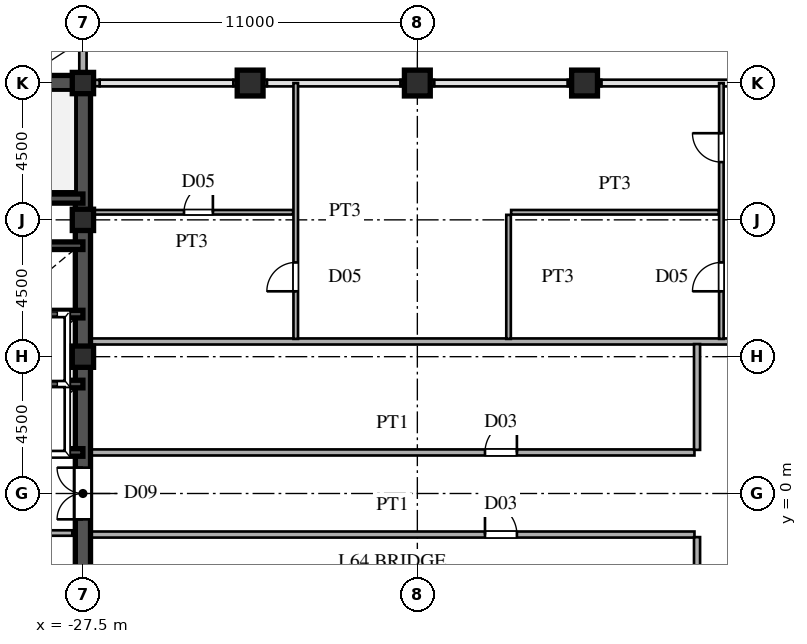
"""IFC4 building model, lengths in metres.
Left out: names, types, materials, properties, quantities, classifications, styles, units other than length and angle.
Written with IfcOpenShell. Run it as: python <this file> out.ifc"""

import sys

from ifc_helpers import new_model, si_unit, direction, frame, frame_2d, origin, origin_2d, place, context, subcontext, project, spatial, rectangle, hollow_rectangle, extrude, source, transform, mapped, element, fill, save


model = new_model("IFC4")
c1 = context("Model", 3, precision=1e-05, world=origin(), true_north=direction((0.0, 1.0)))
c2 = subcontext(c1, "Body", "Model", "MODEL_VIEW")
j1 = project(units=[si_unit("LENGTHUNIT", "METRE"), si_unit("PLANEANGLEUNIT", "RADIAN")], contexts=[c1])
p1 = place(None, origin())
s1 = spatial("IfcSite", under=j1, at=p1, CompositionType="ELEMENT")
p2 = place(p1, origin())
s2 = spatial("IfcBuilding", under=s1, at=p2, CompositionType="ELEMENT")
p3 = place(p2, frame((0.0, 0.0, 243.15)))
s3 = spatial("IfcBuildingStorey", under=s2, at=p3, CompositionType="ELEMENT", Elevation=243.15)
m1 = source(origin(), c2, "Body", "SweptSolid", [
    extrude(hollow_rectangle(XDim=0.7, YDim=0.7, WallThickness=0.03, at=origin_2d()), origin(), (0.0, 0.0, 1.0), 3.75),
])
for number, where, z_axis, x_axis in (
    (1, (-27.5, 4.5, 0.0), (0.0, 0.0, 1.0), (1.0, 0.0, 0.0)),
    (2, (-27.5, 9.0, 0.0), (0.0, 0.0, 1.0), (1.0, 0.0, 0.0)),
    (3, (-27.5, 13.5, 0.0), (0.0, 0.0, 1.0), (1.0, 0.0, 0.0)),
):
    element("IfcColumn", number, at=place(p3, frame(where, z_axis=z_axis, x_axis=x_axis)), inside=s3, PredefinedType="COLUMN", context=c2, shape_type="MappedRepresentation", body=[
        mapped(m1, transform((0.0, 0.0, 0.0), scale=1.0)),
    ])
m2 = source(origin(), c2, "Body", "SweptSolid", [
    extrude(hollow_rectangle(XDim=0.85, YDim=0.85, WallThickness=0.036, at=origin_2d()), origin(), (0.0, 0.0, 1.0), 3.75),
])
for number, where, z_axis, x_axis in (
    (4, (-22.0, 13.5, 0.0), (0.0, 0.0, 1.0), (1.0, 0.0, 0.0)),
    (5, (-16.5, 13.5, 0.0), (0.0, 0.0, 1.0), (1.0, 0.0, 0.0)),
    (6, (-11.0, 13.5, 0.0), (0.0, 0.0, 1.0), (1.0, 0.0, 0.0)),
):
    element("IfcColumn", number, at=place(p3, frame(where, z_axis=z_axis, x_axis=x_axis)), inside=s3, PredefinedType="COLUMN", context=c2, shape_type="MappedRepresentation", body=[
        mapped(m2, transform((0.0, 0.0, 0.0), scale=1.0)),
    ])
p4 = place(p3, frame((-27.5, 13.755, 0.0), z_axis=(0.0, 0.0, 1.0), x_axis=(0.0, 1.0, 0.0)))
e7 = element("IfcWall", 7, at=p4, inside=s3, PredefinedType="SOLIDWALL", context=c2, shape_type="SweptSolid", body=[
    extrude(rectangle(XDim=0.62, YDim=0.24, at=frame_2d((0.31, 0.0))), origin(), (0.0, 0.0, 1.0), 3.03),
])
p5 = place(p3, frame((-27.5, 14.375, 0.0), z_axis=(0.0, 0.0, 1.0), x_axis=(0.0, 1.0, 0.0)))
e8 = element("IfcWall", 8, at=p5, inside=s3, PredefinedType="SOLIDWALL", context=c2, shape_type="SweptSolid", body=[
    extrude(rectangle(XDim=1.605, YDim=0.24, at=frame_2d((0.803, 0.0))), origin(), (0.0, 0.0, 1.0), 3.53),
])
p6 = place(p3, frame((-27.49, 13.5, 0.0), z_axis=(0.0, 0.0, 1.0), x_axis=(1.0, 0.0, 0.0)))
e9 = element("IfcWall", 9, at=p6, inside=s3, PredefinedType="SOLIDWALL", context=c2, shape_type="SweptSolid", body=[
    extrude(rectangle(XDim=0.54, YDim=0.21, at=frame_2d((0.27, 0.0))), origin(), (0.0, 0.0, 1.0), 3.03),
])
for number, where, z_axis, x_axis in (
    (10, (-22.55, 13.5, 0.0), (0.0, 0.0, 1.0), (1.0, 0.0, 0.0)),
    (11, (-17.05, 13.5, 0.0), (0.0, 0.0, 1.0), (1.0, 0.0, 0.0)),
    (12, (-11.55, 13.5, 0.0), (0.0, 0.0, 1.0), (1.0, 0.0, 0.0)),
):
    element("IfcWall", number, at=place(p3, frame(where, z_axis=z_axis, x_axis=x_axis)), inside=s3, PredefinedType="SOLIDWALL", context=c2, shape_type="SweptSolid", body=[
        extrude(rectangle(XDim=1.1, YDim=0.21, at=frame_2d((0.55, 0.0))), origin(), (0.0, 0.0, 1.0), 3.03),
    ])
for number, where, z_axis, x_axis in (
    (13, (-27.5, -13.5, 0.0), (0.0, 0.0, 1.0), (0.0, 1.0, 0.0)),
    (14, (-27.5, 1.3, 0.0), (0.0, 0.0, 1.0), (0.0, 1.0, 0.0)),
):
    element("IfcWall", number, at=place(p3, frame(where, z_axis=z_axis, x_axis=x_axis)), inside=s3, PredefinedType="SHEAR", context=c2, shape_type="SweptSolid", body=[
        extrude(rectangle(XDim=12.2, YDim=0.5, at=frame_2d((6.1, 0.0))), origin(), (0.0, 0.0, 1.0), 3.53),
    ])
p7 = place(p3, frame((-27.5, -1.3, 0.0), z_axis=(0.0, 0.0, 1.0), x_axis=(0.0, 1.0, 0.0)))
e15 = element("IfcWall", 15, at=p7, inside=s3, PredefinedType="SHEAR", context=c2, shape_type="SweptSolid", body=[
    extrude(rectangle(XDim=2.6, YDim=0.5, at=frame_2d((1.3, 0.0))), origin(), (0.0, 0.0, 1.0), 3.53),
])
p8 = place(p7, frame((0.45, 0.0, 0.0)))
e16 = element("IfcOpeningElement", 16, at=p8, cuts=e15, PredefinedType="OPENING", context=c2, shape_type="SweptSolid", body=[
    extrude(rectangle(XDim=1.7, YDim=2.35, at=frame_2d((0.85, 1.175))), frame((0.0, 0.26, 0.0), z_axis=(0.0, -1.0, 0.0), x_axis=(1.0, 0.0, 0.0)), (0.0, 0.0, 1.0), 0.52),
])
p9 = place(p3, frame((-36.5, 13.5, 0.0), z_axis=(0.0, 0.0, 1.0), x_axis=(1.0, 0.0, 0.0)))
e17 = element("IfcWall", 17, at=p9, inside=s3, PredefinedType="SHEAR", context=c2, shape_type="SweptSolid", body=[
    extrude(rectangle(XDim=9.0, YDim=0.5, at=frame_2d((4.5, 0.0))), origin(), (0.0, 0.0, 1.0), 3.53),
])
p10 = place(p3, frame((-36.5, 9.7, 0.0), z_axis=(0.0, 0.0, 1.0), x_axis=(1.0, 0.0, 0.0)))
e18 = element("IfcWall", 18, at=p10, inside=s3, PredefinedType="SHEAR", context=c2, shape_type="SweptSolid", body=[
    extrude(rectangle(XDim=9.0, YDim=0.3, at=frame_2d((4.5, 0.0))), origin(), (0.0, 0.0, 1.0), 3.53),
])
p11 = place(p10, frame((0.6, 0.0, 0.0)))
e19 = element("IfcOpeningElement", 19, at=p11, cuts=e18, PredefinedType="OPENING", context=c2, shape_type="SweptSolid", body=[
    extrude(rectangle(XDim=1.1, YDim=2.2, at=frame_2d((0.55, 1.1))), frame((0.0, 0.16, 0.0), z_axis=(0.0, -1.0, 0.0), x_axis=(1.0, 0.0, 0.0)), (0.0, 0.0, 1.0), 0.32),
])
for number, where, z_axis, x_axis in (
    (20, (-30.3, 1.35, 0.0), (0.0, 0.0, 1.0), (1.0, 0.0, 0.0)),
    (21, (-30.3, 3.6, 0.0), (0.0, 0.0, 1.0), (1.0, 0.0, 0.0)),
    (22, (-30.3, 5.9, 0.0), (0.0, 0.0, 1.0), (1.0, 0.0, 0.0)),
    (23, (-30.3, 8.15, 0.0), (0.0, 0.0, 1.0), (1.0, 0.0, 0.0)),
):
    element("IfcWall", number, at=place(p3, frame(where, z_axis=z_axis, x_axis=x_axis)), inside=s3, PredefinedType="SHEAR", context=c2, shape_type="SweptSolid", body=[
        extrude(rectangle(XDim=2.8, YDim=0.25, at=frame_2d((1.4, 0.0))), origin(), (0.0, 0.0, 1.0), 3.53),
    ])
p12 = place(p3, frame((-30.3, -1.3, 0.0), z_axis=(0.0, 0.0, 1.0), x_axis=(1.0, 0.0, 0.0)))
e24 = element("IfcWall", 24, at=p12, inside=s3, PredefinedType="PARTITIONING", context=c2, shape_type="SweptSolid", body=[
    extrude(rectangle(XDim=2.45, YDim=0.18, at=frame_2d((1.225, 0.0))), origin(), (0.0, 0.0, 1.0), 3.53),
])
p13 = place(p12, frame((0.275, 0.0, 0.0)))
e25 = element("IfcOpeningElement", 25, at=p13, cuts=e24, PredefinedType="OPENING", context=c2, shape_type="SweptSolid", body=[
    extrude(rectangle(XDim=0.95, YDim=2.15, at=frame_2d((0.475, 1.075))), frame((0.0, 0.1, 0.0), z_axis=(0.0, -1.0, 0.0), x_axis=(1.0, 0.0, 0.0)), (0.0, 0.0, 1.0), 0.2),
])
p14 = place(p3, frame((-27.245, -1.35, 0.0), z_axis=(0.0, 0.0, 1.0), x_axis=(1.0, 0.0, 0.0)))
e26 = element("IfcWall", 26, at=p14, inside=s3, PredefinedType="PARTITIONING", context=c2, shape_type="SweptSolid", body=[
    extrude(rectangle(XDim=19.86, YDim=0.2, at=frame_2d((9.93, 0.0))), origin(), (0.0, 0.0, 1.0), 3.53),
])
p15 = place(p14, frame((12.97, 0.0, 0.0)))
e27 = element("IfcOpeningElement", 27, at=p15, cuts=e26, PredefinedType="OPENING", context=c2, shape_type="SweptSolid", body=[
    extrude(rectangle(XDim=1.05, YDim=2.25, at=frame_2d((0.525, 1.125))), frame((0.0, 0.11, 0.0), z_axis=(0.0, -1.0, 0.0), x_axis=(1.0, 0.0, 0.0)), (0.0, 0.0, 1.0), 0.22),
])
p16 = place(p3, frame((-27.245, 1.35, 0.0), z_axis=(0.0, 0.0, 1.0), x_axis=(1.0, 0.0, 0.0)))
e28 = element("IfcWall", 28, at=p16, inside=s3, PredefinedType="PARTITIONING", context=c2, shape_type="SweptSolid", body=[
    extrude(rectangle(XDim=19.86, YDim=0.2, at=frame_2d((9.93, 0.0))), origin(), (0.0, 0.0, 1.0), 3.53),
])
p17 = place(p16, frame((12.97, 0.0, 0.0)))
e29 = element("IfcOpeningElement", 29, at=p17, cuts=e28, PredefinedType="OPENING", context=c2, shape_type="SweptSolid", body=[
    extrude(rectangle(XDim=1.05, YDim=2.25, at=frame_2d((0.525, 1.125))), frame((0.0, 0.11, 0.0), z_axis=(0.0, -1.0, 0.0), x_axis=(1.0, 0.0, 0.0)), (0.0, 0.0, 1.0), 0.22),
])
p18 = place(p3, frame((-27.245, 5.0, 0.0), z_axis=(0.0, 0.0, 1.0), x_axis=(1.0, 0.0, 0.0)))
e30 = element("IfcWall", 30, at=p18, inside=s3, PredefinedType="PARTITIONING", context=c2, shape_type="SweptSolid", body=[
    extrude(rectangle(XDim=54.49, YDim=0.2, at=frame_2d((27.245, 0.0))), origin(), (0.0, 0.0, 1.0), 3.53),
])
p19 = place(p18, frame((23.47, 0.0, 0.0)))
e31 = element("IfcOpeningElement", 31, at=p19, cuts=e30, PredefinedType="OPENING", context=c2, shape_type="SweptSolid", body=[
    extrude(rectangle(XDim=1.05, YDim=2.25, at=frame_2d((0.525, 1.125))), frame((0.0, 0.11, 0.0), z_axis=(0.0, -1.0, 0.0), x_axis=(1.0, 0.0, 0.0)), (0.0, 0.0, 1.0), 0.22),
])
p20 = place(p3, frame((-27.245, 9.25, 0.0), z_axis=(0.0, 0.0, 1.0), x_axis=(1.0, 0.0, 0.0)))
e32 = element("IfcWall", 32, at=p20, inside=s3, PredefinedType="PARTITIONING", context=c2, shape_type="SweptSolid", body=[
    extrude(rectangle(XDim=6.66, YDim=0.15, at=frame_2d((3.33, 0.0))), origin(), (0.0, 0.0, 1.0), 3.53),
])
p21 = place(p20, frame((3.07, 0.0, 0.0)))
e33 = element("IfcOpeningElement", 33, at=p21, cuts=e32, PredefinedType="OPENING", context=c2, shape_type="SweptSolid", body=[
    extrude(rectangle(XDim=0.95, YDim=2.15, at=frame_2d((0.475, 1.075))), frame((0.0, 0.085, 0.0), z_axis=(0.0, -1.0, 0.0), x_axis=(1.0, 0.0, 0.0)), (0.0, 0.0, 1.0), 0.17),
])
p22 = place(p3, frame((-13.415, 9.25, 0.0), z_axis=(0.0, 0.0, 1.0), x_axis=(1.0, 0.0, 0.0)))
e34 = element("IfcWall", 34, at=p22, inside=s3, PredefinedType="PARTITIONING", context=c2, shape_type="SweptSolid", body=[
    extrude(rectangle(XDim=6.83, YDim=0.15, at=frame_2d((3.415, 0.0))), origin(), (0.0, 0.0, 1.0), 3.53),
])
p23 = place(p3, frame((-20.5, 5.085, 0.0), z_axis=(0.0, 0.0, 1.0), x_axis=(0.0, 1.0, 0.0)))
e35 = element("IfcWall", 35, at=p23, inside=s3, PredefinedType="PARTITIONING", context=c2, shape_type="SweptSolid", body=[
    extrude(rectangle(XDim=8.415, YDim=0.15, at=frame_2d((4.208, 0.0))), origin(), (0.0, 0.0, 1.0), 3.53),
])
p24 = place(p23, frame((1.565, 0.0, 0.0)))
e36 = element("IfcOpeningElement", 36, at=p24, cuts=e35, PredefinedType="OPENING", context=c2, shape_type="SweptSolid", body=[
    extrude(rectangle(XDim=0.95, YDim=2.15, at=frame_2d((0.475, 1.075))), frame((0.0, 0.085, 0.0), z_axis=(0.0, -1.0, 0.0), x_axis=(1.0, 0.0, 0.0)), (0.0, 0.0, 1.0), 0.17),
])
p25 = place(p3, frame((-13.5, 5.085, 0.0), z_axis=(0.0, 0.0, 1.0), x_axis=(0.0, 1.0, 0.0)))
e37 = element("IfcWall", 37, at=p25, inside=s3, PredefinedType="PARTITIONING", context=c2, shape_type="SweptSolid", body=[
    extrude(rectangle(XDim=4.08, YDim=0.15, at=frame_2d((2.04, 0.0))), origin(), (0.0, 0.0, 1.0), 3.53),
])
for number, where, z_axis, x_axis in (
    (38, (-7.3, -4.915, 0.0), (0.0, 0.0, 1.0), (0.0, 1.0, 0.0)),
    (39, (-7.3, 1.435, 0.0), (0.0, 0.0, 1.0), (0.0, 1.0, 0.0)),
):
    element("IfcWall", number, at=place(p3, frame(where, z_axis=z_axis, x_axis=x_axis)), inside=s3, PredefinedType="PARTITIONING", context=c2, shape_type="SweptSolid", body=[
        extrude(rectangle(XDim=3.48, YDim=0.2, at=frame_2d((1.74, 0.0))), origin(), (0.0, 0.0, 1.0), 3.53),
    ])
p26 = place(p3, frame((-6.5, 5.085, 0.0), z_axis=(0.0, 0.0, 1.0), x_axis=(0.0, 1.0, 0.0)))
e40 = element("IfcWall", 40, at=p26, inside=s3, PredefinedType="PARTITIONING", context=c2, shape_type="SweptSolid", body=[
    extrude(rectangle(XDim=8.415, YDim=0.15, at=frame_2d((4.208, 0.0))), origin(), (0.0, 0.0, 1.0), 3.53),
])
p27 = place(p26, frame((1.565, 0.0, 0.0)))
e41 = element("IfcOpeningElement", 41, at=p27, cuts=e40, PredefinedType="OPENING", context=c2, shape_type="SweptSolid", body=[
    extrude(rectangle(XDim=0.95, YDim=2.15, at=frame_2d((0.475, 1.075))), frame((0.0, 0.085, 0.0), z_axis=(0.0, -1.0, 0.0), x_axis=(1.0, 0.0, 0.0)), (0.0, 0.0, 1.0), 0.17),
])
p28 = place(p26, frame((5.815, 0.0, 0.0)))
e42 = element("IfcOpeningElement", 42, at=p28, cuts=e40, PredefinedType="OPENING", context=c2, shape_type="SweptSolid", body=[
    extrude(rectangle(XDim=0.95, YDim=2.15, at=frame_2d((0.475, 1.075))), frame((0.0, 0.085, 0.0), z_axis=(0.0, -1.0, 0.0), x_axis=(1.0, 0.0, 0.0)), (0.0, 0.0, 1.0), 0.17),
])
m3 = source(origin(), c2, "Body", "SweptSolid", [
    extrude(rectangle(XDim=1.7, YDim=2.35, at=frame_2d((0.85, 1.175))), frame((0.0, 0.025, 0.0), z_axis=(0.0, -1.0, 0.0), x_axis=(1.0, 0.0, 0.0)), (0.0, 0.0, 1.0), 0.05),
])
p29 = place(p8, origin())
e43 = element("IfcDoor", 43, at=p29, inside=s3, OperationType="DOUBLE_SWING_LEFT", PredefinedType="DOOR", context=c2, shape_type="MappedRepresentation", body=[
    mapped(m3, transform((0.0, 0.0, 0.0), scale=1.0)),
])
fill(e16, e43)
m4 = source(origin(), c2, "Body", "SweptSolid", [
    extrude(rectangle(XDim=1.05, YDim=2.25, at=frame_2d((0.525, 1.125))), frame((0.0, 0.025, 0.0), z_axis=(0.0, -1.0, 0.0), x_axis=(1.0, 0.0, 0.0)), (0.0, 0.0, 1.0), 0.05),
])
p30 = place(p15, origin())
e44 = element("IfcDoor", 44, at=p30, inside=s3, OperationType="SINGLE_SWING_LEFT", PredefinedType="DOOR", context=c2, shape_type="MappedRepresentation", body=[
    mapped(m4, transform((0.0, 0.0, 0.0), scale=1.0)),
])
fill(e27, e44)
p31 = place(p17, origin())
e45 = element("IfcDoor", 45, at=p31, inside=s3, OperationType="SINGLE_SWING_RIGHT", PredefinedType="DOOR", context=c2, shape_type="MappedRepresentation", body=[
    mapped(m4, transform((0.0, 0.0, 0.0), scale=1.0)),
])
fill(e29, e45)
m5 = source(origin(), c2, "Body", "SweptSolid", [
    extrude(rectangle(XDim=0.95, YDim=2.15, at=frame_2d((0.475, 1.075))), frame((0.0, 0.025, 0.0), z_axis=(0.0, -1.0, 0.0), x_axis=(1.0, 0.0, 0.0)), (0.0, 0.0, 1.0), 0.05),
])
p32 = place(p21, origin())
e46 = element("IfcDoor", 46, at=p32, inside=s3, OperationType="SINGLE_SWING_RIGHT", PredefinedType="DOOR", context=c2, shape_type="MappedRepresentation", body=[
    mapped(m5, transform((0.0, 0.0, 0.0), scale=1.0)),
])
fill(e33, e46)
p33 = place(p24, origin())
e47 = element("IfcDoor", 47, at=p33, inside=s3, OperationType="SINGLE_SWING_LEFT", PredefinedType="DOOR", context=c2, shape_type="MappedRepresentation", body=[
    mapped(m5, transform((0.0, 0.0, 0.0), scale=1.0)),
])
fill(e36, e47)
p34 = place(p27, origin())
e48 = element("IfcDoor", 48, at=p34, inside=s3, OperationType="SINGLE_SWING_LEFT", PredefinedType="DOOR", context=c2, shape_type="MappedRepresentation", body=[
    mapped(m5, transform((0.0, 0.0, 0.0), scale=1.0)),
])
fill(e41, e48)
p35 = place(p28, origin())
e49 = element("IfcDoor", 49, at=p35, inside=s3, OperationType="SINGLE_SWING_RIGHT", PredefinedType="DOOR", context=c2, shape_type="MappedRepresentation", body=[
    mapped(m5, transform((0.0, 0.0, 0.0), scale=1.0)),
])
fill(e42, e49)
save(model, sys.argv[1])
